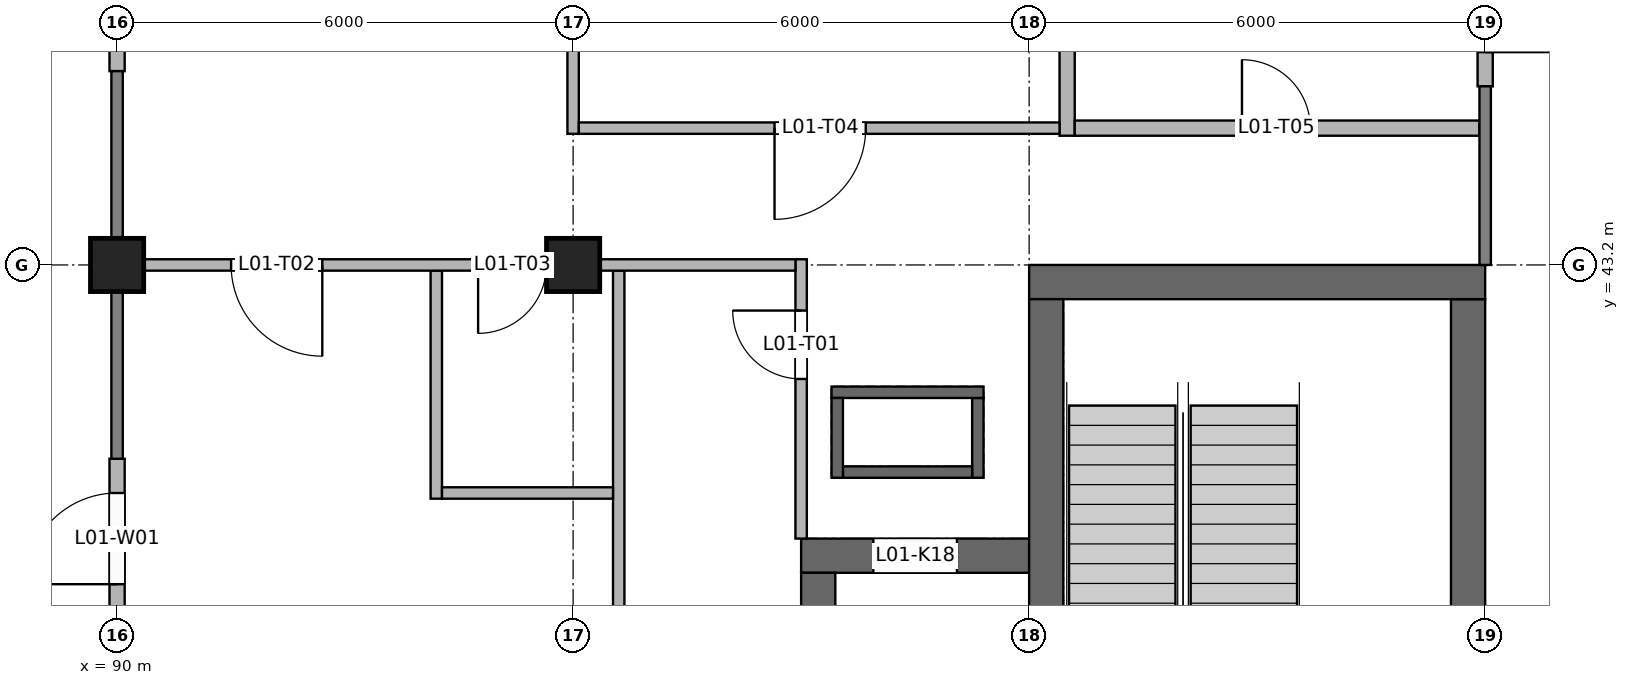
"""IFC4 building model, lengths in metres.
Left out: names, types, materials, properties, quantities, classifications, styles, units other than length and angle.
Written with IfcOpenShell. Run it as: python <this file> out.ifc"""

import sys

from ifc_helpers import new_model, si_unit, direction, frame, frame_2d, origin, origin_2d, place, context, subcontext, project, spatial, rectangle, extrude, element, fill, save


model = new_model("IFC4")
c1 = context("Model", 3, precision=1e-05, world=origin(), true_north=direction((0.0, 1.0)))
c2 = subcontext(c1, "Body", "Model", "MODEL_VIEW")
j1 = project(units=[si_unit("LENGTHUNIT", "METRE"), si_unit("PLANEANGLEUNIT", "RADIAN")], contexts=[c1])
p1 = place(None, origin())
s1 = spatial("IfcSite", under=j1, at=p1, CompositionType="ELEMENT")
p2 = place(p1, origin())
s2 = spatial("IfcBuilding", under=s1, at=p2, CompositionType="ELEMENT")
p3 = place(p2, frame((0.0, 0.0, 4.2)))
s3 = spatial("IfcBuildingStorey", under=s2, at=p3, CompositionType="ELEMENT", Elevation=4.2)
p4 = place(p3, frame((102.0, 42.975, 0.0), z_axis=(0.0, 0.0, 1.0), x_axis=(1.0, 0.0, 0.0)))
e1 = element("IfcWall", 1, at=p4, inside=s3, PredefinedType="SHEAR", context=c2, shape_type="SweptSolid", body=[
    extrude(rectangle(XDim=6.0, YDim=0.45, at=frame_2d((3.0, 0.0))), origin(), (0.0, 0.0, 1.0), 3.95),
])
p5 = place(p4, frame((2.4, 0.0, 0.0)))
e2 = element("IfcOpeningElement", 2, at=p5, cuts=e1, PredefinedType="OPENING", context=c2, shape_type="SweptSolid", body=[
    extrude(rectangle(XDim=1.2, YDim=2.1, at=frame_2d((0.6, 1.05))), frame((0.0, 0.235, 0.0), z_axis=(0.0, -1.0, 0.0), x_axis=(1.0, 0.0, 0.0)), (0.0, 0.0, 1.0), 0.47),
])
p6 = place(p3, frame((102.225, 36.45, 0.0), z_axis=(0.0, 0.0, 1.0), x_axis=(0.0, 1.0, 0.0)))
e3 = element("IfcWall", 3, at=p6, inside=s3, PredefinedType="SHEAR", context=c2, shape_type="SweptSolid", body=[
    extrude(rectangle(XDim=6.3, YDim=0.45, at=frame_2d((3.15, 0.0))), origin(), (0.0, 0.0, 1.0), 3.95),
])
p7 = place(p3, frame((107.775, 36.45, 0.0), z_axis=(0.0, 0.0, 1.0), x_axis=(0.0, 1.0, 0.0)))
e4 = element("IfcWall", 4, at=p7, inside=s3, PredefinedType="SHEAR", context=c2, shape_type="SweptSolid", body=[
    extrude(rectangle(XDim=6.3, YDim=0.45, at=frame_2d((3.15, 0.0))), origin(), (0.0, 0.0, 1.0), 3.95),
])
p8 = place(p7, frame((1.65, 0.0, 0.0)))
e5 = element("IfcOpeningElement", 5, at=p8, cuts=e4, PredefinedType="OPENING", context=c2, shape_type="SweptSolid", body=[
    extrude(rectangle(XDim=1.4, YDim=2.1, at=frame_2d((0.7, 1.05))), frame((0.0, 0.235, 0.0), z_axis=(0.0, -1.0, 0.0), x_axis=(1.0, 0.0, 0.0)), (0.0, 0.0, 1.0), 0.47),
])
p9 = place(p3, frame((99.0, 39.375, 0.0), z_axis=(0.0, 0.0, 1.0), x_axis=(1.0, 0.0, 0.0)))
e6 = element("IfcWall", 6, at=p9, inside=s3, PredefinedType="SHEAR", context=c2, shape_type="SweptSolid", body=[
    extrude(rectangle(XDim=3.0, YDim=0.45, at=frame_2d((1.5, 0.0))), origin(), (0.0, 0.0, 1.0), 4.2),
])
p10 = place(p9, frame((0.95, 0.0, 0.0)))
e7 = element("IfcOpeningElement", 7, at=p10, cuts=e6, PredefinedType="OPENING", context=c2, shape_type="SweptSolid", body=[
    extrude(rectangle(XDim=1.1, YDim=2.1, at=frame_2d((0.55, 1.05))), frame((0.0, 0.235, 0.0), z_axis=(0.0, -1.0, 0.0), x_axis=(1.0, 0.0, 0.0)), (0.0, 0.0, 1.0), 0.47),
])
p11 = place(p3, frame((99.225, 36.45, 0.0), z_axis=(0.0, 0.0, 1.0), x_axis=(0.0, 1.0, 0.0)))
e8 = element("IfcWall", 8, at=p11, inside=s3, PredefinedType="SHEAR", context=c2, shape_type="SweptSolid", body=[
    extrude(rectangle(XDim=2.7, YDim=0.45, at=frame_2d((1.35, 0.0))), origin(), (0.0, 0.0, 1.0), 4.2),
])
p12 = place(p3, frame((102.0, 42.975, -0.2), z_axis=(0.0, 0.0, 1.0), x_axis=(1.0, 0.0, 0.0)))
e9 = element("IfcWall", 9, at=p12, inside=s3, PredefinedType="SOLIDWALL", context=c2, shape_type="SweptSolid", body=[
    extrude(rectangle(XDim=6.0, YDim=0.45, at=frame_2d((3.0, 0.0))), origin(), (0.0, 0.0, 1.0), 0.2),
])
p13 = place(p3, frame((107.775, 36.45, -0.2), z_axis=(0.0, 0.0, 1.0), x_axis=(0.0, 1.0, 0.0)))
e10 = element("IfcWall", 10, at=p13, inside=s3, PredefinedType="SOLIDWALL", context=c2, shape_type="SweptSolid", body=[
    extrude(rectangle(XDim=6.3, YDim=0.45, at=frame_2d((3.15, 0.0))), origin(), (0.0, 0.0, 1.0), 0.2),
])
p14 = place(p3, frame((99.4, 40.475, 0.0), z_axis=(0.0, 0.0, 1.0), x_axis=(1.0, 0.0, 0.0)))
e11 = element("IfcWall", 11, at=p14, inside=s3, PredefinedType="SOLIDWALL", context=c2, shape_type="SweptSolid", body=[
    extrude(rectangle(XDim=2.0, YDim=0.15, at=frame_2d((1.0, 0.0))), origin(), (0.0, 0.0, 1.0), 4.2),
])
p15 = place(p3, frame((99.4, 41.525, 0.0), z_axis=(0.0, 0.0, 1.0), x_axis=(1.0, 0.0, 0.0)))
e12 = element("IfcWall", 12, at=p15, inside=s3, PredefinedType="SOLIDWALL", context=c2, shape_type="SweptSolid", body=[
    extrude(rectangle(XDim=2.0, YDim=0.15, at=frame_2d((1.0, 0.0))), origin(), (0.0, 0.0, 1.0), 4.2),
])
p16 = place(p15, frame((0.6, 0.0, 0.0)))
e13 = element("IfcOpeningElement", 13, at=p16, cuts=e12, PredefinedType="OPENING", context=c2, shape_type="SweptSolid", body=[
    extrude(rectangle(XDim=0.8, YDim=2.1, at=frame_2d((0.4, 1.05))), frame((0.0, 0.085, 0.0), z_axis=(0.0, -1.0, 0.0), x_axis=(1.0, 0.0, 0.0)), (0.0, 0.0, 1.0), 0.17),
])
for number, where, z_axis, x_axis in (
    (14, (99.475, 40.55, 0.0), (0.0, 0.0, 1.0), (0.0, 1.0, 0.0)),
    (15, (101.325, 40.55, 0.0), (0.0, 0.0, 1.0), (0.0, 1.0, 0.0)),
):
    element("IfcWall", number, at=place(p3, frame(where, z_axis=z_axis, x_axis=x_axis)), inside=s3, PredefinedType="SOLIDWALL", context=c2, shape_type="SweptSolid", body=[
        extrude(rectangle(XDim=0.9, YDim=0.15, at=frame_2d((0.45, 0.0))), origin(), (0.0, 0.0, 1.0), 4.2),
    ])
p17 = place(p3, frame((99.55, 40.475, -0.2), z_axis=(0.0, 0.0, 1.0), x_axis=(1.0, 0.0, 0.0)))
e16 = element("IfcWall", 16, at=p17, inside=s3, PredefinedType="SOLIDWALL", context=c2, shape_type="SweptSolid", body=[
    extrude(rectangle(XDim=1.7, YDim=0.15, at=frame_2d((0.85, 0.0))), origin(), (0.0, 0.0, 1.0), 0.2),
])
p18 = place(p3, frame((99.4, 41.525, -0.2), z_axis=(0.0, 0.0, 1.0), x_axis=(1.0, 0.0, 0.0)))
e17 = element("IfcWall", 17, at=p18, inside=s3, PredefinedType="SOLIDWALL", context=c2, shape_type="SweptSolid", body=[
    extrude(rectangle(XDim=2.0, YDim=0.15, at=frame_2d((1.0, 0.0))), origin(), (0.0, 0.0, 1.0), 0.2),
])
for number, where, z_axis, x_axis in (
    (18, (99.475, 40.4, -0.2), (0.0, 0.0, 1.0), (0.0, 1.0, 0.0)),
    (19, (101.325, 40.4, -0.2), (0.0, 0.0, 1.0), (0.0, 1.0, 0.0)),
):
    element("IfcWall", number, at=place(p3, frame(where, z_axis=z_axis, x_axis=x_axis)), inside=s3, PredefinedType="SOLIDWALL", context=c2, shape_type="SweptSolid", body=[
        extrude(rectangle(XDim=1.05, YDim=0.15, at=frame_2d((0.525, 0.0))), origin(), (0.0, 0.0, 1.0), 0.2),
    ])
for number, where, z_axis, x_axis in (
    (20, (90.0, 43.2, 0.0), (0.0, 0.0, 1.0), (1.0, 0.0, 0.0)),
    (21, (96.0, 43.2, 0.0), (0.0, 0.0, 1.0), (1.0, 0.0, 0.0)),
):
    element("IfcColumn", number, at=place(p3, frame(where, z_axis=z_axis, x_axis=x_axis)), inside=s3, PredefinedType="COLUMN", context=c2, shape_type="SweptSolid", body=[
        extrude(rectangle(XDim=0.7, YDim=0.7, at=origin_2d()), origin(), (0.0, 0.0, 1.0), 3.95),
    ])
p19 = place(p3, frame((90.0, 38.55, 0.0), z_axis=(0.0, 0.0, 1.0), x_axis=(0.0, 1.0, 0.0)))
e22 = element("IfcWall", 22, at=p19, inside=s3, PredefinedType="SOLIDWALL", context=c2, shape_type="SweptSolid", body=[
    extrude(rectangle(XDim=2.1, YDim=0.2, at=frame_2d((1.05, 0.0))), origin(), (0.0, 0.0, 1.0), 3.15),
])
p20 = place(p19, frame((0.45, 0.0, 0.0)))
e23 = element("IfcOpeningElement", 23, at=p20, cuts=e22, PredefinedType="OPENING", context=c2, shape_type="SweptSolid", body=[
    extrude(rectangle(XDim=1.2, YDim=2.4, at=frame_2d((0.6, 1.2))), frame((0.0, 0.11, 0.0), z_axis=(0.0, -1.0, 0.0), x_axis=(1.0, 0.0, 0.0)), (0.0, 0.0, 1.0), 0.22),
])
p21 = place(p3, frame((90.0, 45.75, 0.0), z_axis=(0.0, 0.0, 1.0), x_axis=(0.0, 1.0, 0.0)))
e24 = element("IfcWall", 24, at=p21, inside=s3, PredefinedType="SOLIDWALL", context=c2, shape_type="SweptSolid", body=[
    extrude(rectangle(XDim=2.1, YDim=0.2, at=frame_2d((1.05, 0.0))), origin(), (0.0, 0.0, 1.0), 3.05),
])
p22 = place(p21, frame((0.45, 0.0, 0.0)))
e25 = element("IfcOpeningElement", 25, at=p22, cuts=e24, PredefinedType="OPENING", context=c2, shape_type="SweptSolid", body=[
    extrude(rectangle(XDim=1.2, YDim=2.4, at=frame_2d((0.6, 1.2))), frame((0.0, 0.11, 0.0), z_axis=(0.0, -1.0, 0.0), x_axis=(1.0, 0.0, 0.0)), (0.0, 0.0, 1.0), 0.22),
])
p23 = place(p3, frame((108.0, 45.55, 0.0), z_axis=(0.0, 0.0, 1.0), x_axis=(0.0, 1.0, 0.0)))
e26 = element("IfcWall", 26, at=p23, inside=s3, PredefinedType="SOLIDWALL", context=c2, shape_type="SweptSolid", body=[
    extrude(rectangle(XDim=2.1, YDim=0.2, at=frame_2d((1.05, 0.0))), origin(), (0.0, 0.0, 1.0), 3.05),
])
p24 = place(p23, frame((0.45, 0.0, 0.0)))
e27 = element("IfcOpeningElement", 27, at=p24, cuts=e26, PredefinedType="OPENING", context=c2, shape_type="SweptSolid", body=[
    extrude(rectangle(XDim=1.2, YDim=2.4, at=frame_2d((0.6, 1.2))), frame((0.0, 0.11, 0.0), z_axis=(0.0, -1.0, 0.0), x_axis=(1.0, 0.0, 0.0)), (0.0, 0.0, 1.0), 0.22),
])
p25 = place(p3, frame((94.2, 40.125, 0.0), z_axis=(0.0, 0.0, 1.0), x_axis=(0.0, 1.0, 0.0)))
e28 = element("IfcWall", 28, at=p25, inside=s3, PredefinedType="PARTITIONING", context=c2, shape_type="SweptSolid", body=[
    extrude(rectangle(XDim=3.0, YDim=0.15, at=frame_2d((1.5, 0.0))), origin(), (0.0, 0.0, 1.0), 3.25),
])
p26 = place(p3, frame((96.0, 44.925, 0.0), z_axis=(0.0, 0.0, 1.0), x_axis=(0.0, 1.0, 0.0)))
e29 = element("IfcWall", 29, at=p26, inside=s3, PredefinedType="PARTITIONING", context=c2, shape_type="SweptSolid", body=[
    extrude(rectangle(XDim=5.475, YDim=0.15, at=frame_2d((2.737, 0.0))), origin(), (0.0, 0.0, 1.0), 3.95),
])
p27 = place(p3, frame((96.6, 36.15, 0.0), z_axis=(0.0, 0.0, 1.0), x_axis=(0.0, 1.0, 0.0)))
e30 = element("IfcWall", 30, at=p27, inside=s3, PredefinedType="PARTITIONING", context=c2, shape_type="SweptSolid", body=[
    extrude(rectangle(XDim=6.975, YDim=0.15, at=frame_2d((3.488, 0.0))), origin(), (0.0, 0.0, 1.0), 3.25),
])
p28 = place(p3, frame((99.0, 39.6, 0.0), z_axis=(0.0, 0.0, 1.0), x_axis=(0.0, 1.0, 0.0)))
e31 = element("IfcWall", 31, at=p28, inside=s3, PredefinedType="PARTITIONING", context=c2, shape_type="SweptSolid", body=[
    extrude(rectangle(XDim=3.675, YDim=0.15, at=frame_2d((1.837, 0.0))), origin(), (0.0, 0.0, 1.0), 3.95),
])
p29 = place(p28, frame((2.1, 0.0, 0.0)))
e32 = element("IfcOpeningElement", 32, at=p29, cuts=e31, PredefinedType="OPENING", context=c2, shape_type="SweptSolid", body=[
    extrude(rectangle(XDim=0.9, YDim=2.1, at=frame_2d((0.45, 1.05))), frame((0.0, 0.085, 0.0), z_axis=(0.0, -1.0, 0.0), x_axis=(1.0, 0.0, 0.0)), (0.0, 0.0, 1.0), 0.17),
])
p30 = place(p3, frame((102.5, 44.9, 0.0), z_axis=(0.0, 0.0, 1.0), x_axis=(0.0, 1.0, 0.0)))
e33 = element("IfcWall", 33, at=p30, inside=s3, PredefinedType="PARTITIONING", context=c2, shape_type="SweptSolid", body=[
    extrude(rectangle(XDim=12.55, YDim=0.2, at=frame_2d((6.275, 0.0))), origin(), (0.0, 0.0, 1.0), 3.25),
])
p31 = place(p3, frame((94.275, 40.2, 0.0), z_axis=(0.0, 0.0, 1.0), x_axis=(1.0, 0.0, 0.0)))
e34 = element("IfcWall", 34, at=p31, inside=s3, PredefinedType="PARTITIONING", context=c2, shape_type="SweptSolid", body=[
    extrude(rectangle(XDim=2.25, YDim=0.15, at=frame_2d((1.125, 0.0))), origin(), (0.0, 0.0, 1.0), 3.15),
])
p32 = place(p3, frame((90.15, 43.2, 0.0), z_axis=(0.0, 0.0, 1.0), x_axis=(1.0, 0.0, 0.0)))
e35 = element("IfcWall", 35, at=p32, inside=s3, PredefinedType="PARTITIONING", context=c2, shape_type="SweptSolid", body=[
    extrude(rectangle(XDim=8.775, YDim=0.15, at=frame_2d((4.388, 0.0))), origin(), (0.0, 0.0, 1.0), 3.25),
])
p33 = place(p32, frame((1.35, 0.0, 0.0)))
e36 = element("IfcOpeningElement", 36, at=p33, cuts=e35, PredefinedType="OPENING", context=c2, shape_type="SweptSolid", body=[
    extrude(rectangle(XDim=1.2, YDim=2.1, at=frame_2d((0.6, 1.05))), frame((0.0, 0.085, 0.0), z_axis=(0.0, -1.0, 0.0), x_axis=(1.0, 0.0, 0.0)), (0.0, 0.0, 1.0), 0.17),
])
p34 = place(p32, frame((4.6, 0.0, 0.0)))
e37 = element("IfcOpeningElement", 37, at=p34, cuts=e35, PredefinedType="OPENING", context=c2, shape_type="SweptSolid", body=[
    extrude(rectangle(XDim=0.9, YDim=2.1, at=frame_2d((0.45, 1.05))), frame((0.0, 0.085, 0.0), z_axis=(0.0, -1.0, 0.0), x_axis=(1.0, 0.0, 0.0)), (0.0, 0.0, 1.0), 0.17),
])
p35 = place(p3, frame((96.075, 45.0, 0.0), z_axis=(0.0, 0.0, 1.0), x_axis=(1.0, 0.0, 0.0)))
e38 = element("IfcWall", 38, at=p35, inside=s3, PredefinedType="PARTITIONING", context=c2, shape_type="SweptSolid", body=[
    extrude(rectangle(XDim=6.325, YDim=0.15, at=frame_2d((3.163, 0.0))), origin(), (0.0, 0.0, 1.0), 3.95),
])
p36 = place(p35, frame((2.575, 0.0, 0.0)))
e39 = element("IfcOpeningElement", 39, at=p36, cuts=e38, PredefinedType="OPENING", context=c2, shape_type="SweptSolid", body=[
    extrude(rectangle(XDim=1.2, YDim=2.1, at=frame_2d((0.6, 1.05))), frame((0.0, 0.085, 0.0), z_axis=(0.0, -1.0, 0.0), x_axis=(1.0, 0.0, 0.0)), (0.0, 0.0, 1.0), 0.17),
])
p37 = place(p3, frame((102.6, 45.0, 0.0), z_axis=(0.0, 0.0, 1.0), x_axis=(1.0, 0.0, 0.0)))
e40 = element("IfcWall", 40, at=p37, inside=s3, PredefinedType="PARTITIONING", context=c2, shape_type="SweptSolid", body=[
    extrude(rectangle(XDim=5.325, YDim=0.2, at=frame_2d((2.663, 0.0))), origin(), (0.0, 0.0, 1.0), 3.95),
])
p38 = place(p37, frame((2.2, 0.0, 0.0)))
e41 = element("IfcOpeningElement", 41, at=p38, cuts=e40, PredefinedType="OPENING", context=c2, shape_type="SweptSolid", body=[
    extrude(rectangle(XDim=0.9, YDim=2.1, at=frame_2d((0.45, 1.05))), frame((0.0, 0.11, 0.0), z_axis=(0.0, -1.0, 0.0), x_axis=(1.0, 0.0, 0.0)), (0.0, 0.0, 1.0), 0.22),
])
p39 = place(p20, origin())
e42 = element("IfcDoor", 42, at=p39, inside=s3, OperationType="SINGLE_SWING_LEFT", PredefinedType="DOOR", context=c2, shape_type="SweptSolid", body=[
    extrude(rectangle(XDim=1.2, YDim=2.4, at=frame_2d((0.6, 1.2))), frame((0.0, 0.025, 0.0), z_axis=(0.0, -1.0, 0.0), x_axis=(1.0, 0.0, 0.0)), (0.0, 0.0, 1.0), 0.05),
])
fill(e23, e42)
p40 = place(p24, frame((1.2, 0.0, 0.0), z_axis=(0.0, 0.0, 1.0), x_axis=(-1.0, 0.0, 0.0)))
e43 = element("IfcDoor", 43, at=p40, inside=s3, OperationType="SINGLE_SWING_RIGHT", PredefinedType="DOOR", context=c2, shape_type="SweptSolid", body=[
    extrude(rectangle(XDim=1.2, YDim=2.4, at=frame_2d((0.6, 1.2))), frame((0.0, 0.025, 0.0), z_axis=(0.0, -1.0, 0.0), x_axis=(1.0, 0.0, 0.0)), (0.0, 0.0, 1.0), 0.05),
])
fill(e27, e43)
p41 = place(p5, frame((1.2, 0.0, 0.0), z_axis=(0.0, 0.0, 1.0), x_axis=(-1.0, 0.0, 0.0)))
e44 = element("IfcDoor", 44, at=p41, inside=s3, OperationType="SINGLE_SWING_RIGHT", PredefinedType="DOOR", context=c2, shape_type="SweptSolid", body=[
    extrude(rectangle(XDim=1.2, YDim=2.1, at=frame_2d((0.6, 1.05))), frame((0.0, 0.025, 0.0), z_axis=(0.0, -1.0, 0.0), x_axis=(1.0, 0.0, 0.0)), (0.0, 0.0, 1.0), 0.05),
])
fill(e2, e44)
p42 = place(p8, frame((1.4, 0.0, 0.0), z_axis=(0.0, 0.0, 1.0), x_axis=(-1.0, 0.0, 0.0)))
e45 = element("IfcDoor", 45, at=p42, inside=s3, OperationType="DOUBLE_DOOR_SINGLE_SWING", PredefinedType="DOOR", context=c2, shape_type="SweptSolid", body=[
    extrude(rectangle(XDim=1.4, YDim=2.1, at=frame_2d((0.7, 1.05))), frame((0.0, 0.025, 0.0), z_axis=(0.0, -1.0, 0.0), x_axis=(1.0, 0.0, 0.0)), (0.0, 0.0, 1.0), 0.05),
])
fill(e5, e45)
p43 = place(p10, origin())
e46 = element("IfcDoor", 46, at=p43, inside=s3, OperationType="DOUBLE_DOOR_SLIDING", PredefinedType="DOOR", context=c2, shape_type="SweptSolid", body=[
    extrude(rectangle(XDim=1.1, YDim=2.1, at=frame_2d((0.55, 1.05))), frame((0.0, 0.025, 0.0), z_axis=(0.0, -1.0, 0.0), x_axis=(1.0, 0.0, 0.0)), (0.0, 0.0, 1.0), 0.05),
])
fill(e7, e46)
p44 = place(p16, origin())
e47 = element("IfcDoor", 47, at=p44, inside=s3, OperationType="SINGLE_SWING_LEFT", PredefinedType="DOOR", context=c2, shape_type="SweptSolid", body=[
    extrude(rectangle(XDim=0.8, YDim=2.1, at=frame_2d((0.4, 1.05))), frame((0.0, 0.025, 0.0), z_axis=(0.0, -1.0, 0.0), x_axis=(1.0, 0.0, 0.0)), (0.0, 0.0, 1.0), 0.05),
])
fill(e13, e47)
p45 = place(p29, origin())
e48 = element("IfcDoor", 48, at=p45, inside=s3, OperationType="SINGLE_SWING_RIGHT", PredefinedType="DOOR", context=c2, shape_type="SweptSolid", body=[
    extrude(rectangle(XDim=0.9, YDim=2.1, at=frame_2d((0.45, 1.05))), frame((0.0, 0.025, 0.0), z_axis=(0.0, -1.0, 0.0), x_axis=(1.0, 0.0, 0.0)), (0.0, 0.0, 1.0), 0.05),
])
fill(e32, e48)
p46 = place(p33, frame((1.2, 0.0, 0.0), z_axis=(0.0, 0.0, 1.0), x_axis=(-1.0, 0.0, 0.0)))
e49 = element("IfcDoor", 49, at=p46, inside=s3, OperationType="SINGLE_SWING_LEFT", PredefinedType="DOOR", context=c2, shape_type="SweptSolid", body=[
    extrude(rectangle(XDim=1.2, YDim=2.1, at=frame_2d((0.6, 1.05))), frame((0.0, 0.025, 0.0), z_axis=(0.0, -1.0, 0.0), x_axis=(1.0, 0.0, 0.0)), (0.0, 0.0, 1.0), 0.05),
])
fill(e36, e49)
p47 = place(p34, frame((0.9, 0.0, 0.0), z_axis=(0.0, 0.0, 1.0), x_axis=(-1.0, 0.0, 0.0)))
e50 = element("IfcDoor", 50, at=p47, inside=s3, OperationType="SINGLE_SWING_RIGHT", PredefinedType="DOOR", context=c2, shape_type="SweptSolid", body=[
    extrude(rectangle(XDim=0.9, YDim=2.1, at=frame_2d((0.45, 1.05))), frame((0.0, 0.025, 0.0), z_axis=(0.0, -1.0, 0.0), x_axis=(1.0, 0.0, 0.0)), (0.0, 0.0, 1.0), 0.05),
])
fill(e37, e50)
p48 = place(p36, frame((1.2, 0.0, 0.0), z_axis=(0.0, 0.0, 1.0), x_axis=(-1.0, 0.0, 0.0)))
e51 = element("IfcDoor", 51, at=p48, inside=s3, OperationType="SINGLE_SWING_RIGHT", PredefinedType="DOOR", context=c2, shape_type="SweptSolid", body=[
    extrude(rectangle(XDim=1.2, YDim=2.1, at=frame_2d((0.6, 1.05))), frame((0.0, 0.025, 0.0), z_axis=(0.0, -1.0, 0.0), x_axis=(1.0, 0.0, 0.0)), (0.0, 0.0, 1.0), 0.05),
])
fill(e39, e51)
p49 = place(p38, origin())
e52 = element("IfcDoor", 52, at=p49, inside=s3, OperationType="SINGLE_SWING_LEFT", PredefinedType="DOOR", context=c2, shape_type="SweptSolid", body=[
    extrude(rectangle(XDim=0.9, YDim=2.1, at=frame_2d((0.45, 1.05))), frame((0.0, 0.025, 0.0), z_axis=(0.0, -1.0, 0.0), x_axis=(1.0, 0.0, 0.0)), (0.0, 0.0, 1.0), 0.05),
])
fill(e41, e52)
save(model, sys.argv[1])
